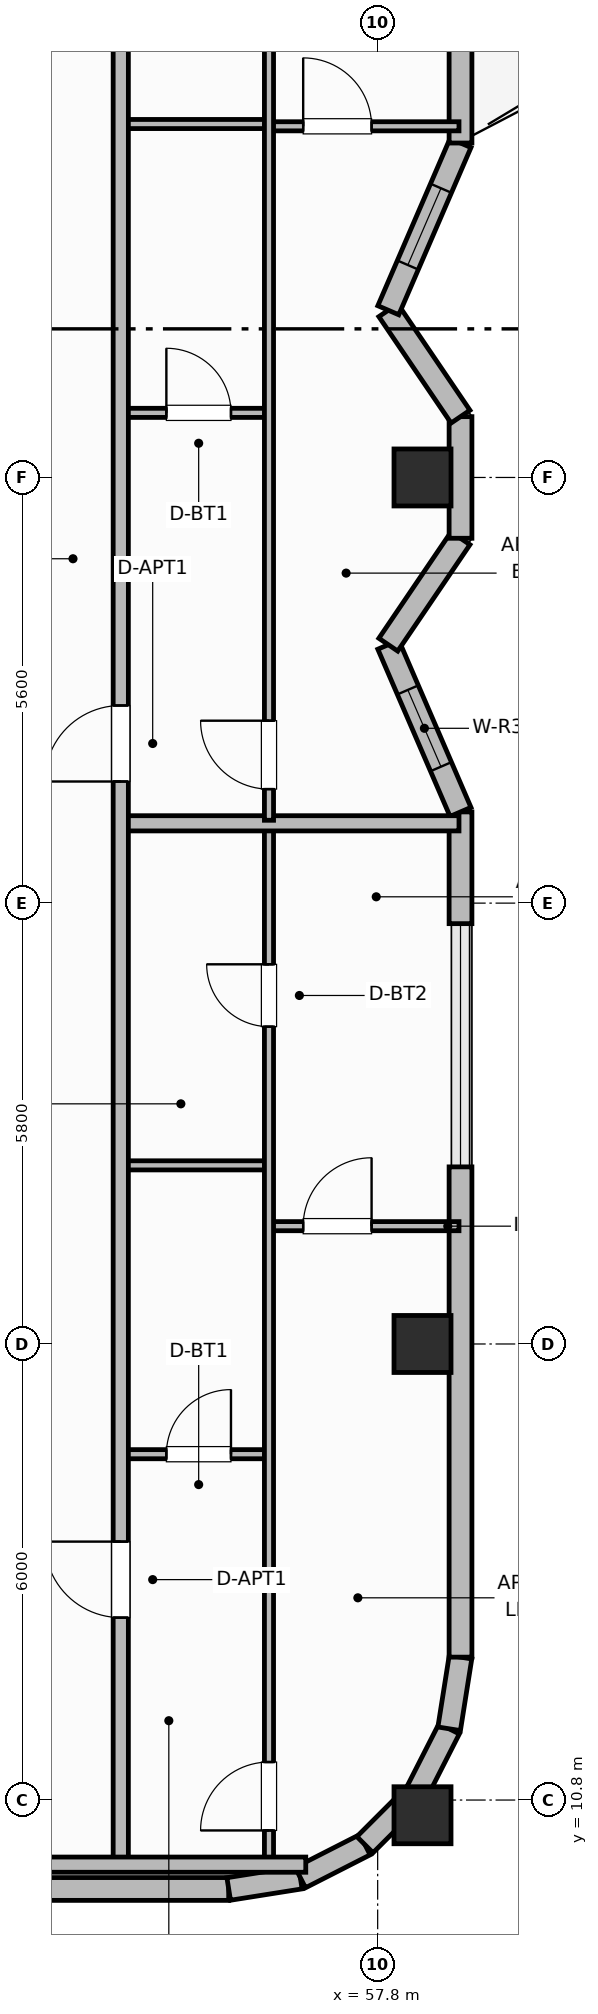
"""IFC4 building model, lengths in metres.
Left out: names, types, materials, properties, quantities, classifications, styles, units other than length and angle.
Written with IfcOpenShell. Run it as: python <this file> out.ifc"""

import sys

from ifc_helpers import new_model, si_unit, direction, frame, frame_2d, origin, origin_2d, place, context, subcontext, project, spatial, rectangle, extrude, element, fill, save


model = new_model("IFC4")
c1 = context("Model", 3, precision=1e-05, world=origin(), true_north=direction((0.0, 1.0)))
c2 = subcontext(c1, "Body", "Model", "MODEL_VIEW")
j1 = project(units=[si_unit("LENGTHUNIT", "METRE"), si_unit("PLANEANGLEUNIT", "RADIAN")], contexts=[c1])
p1 = place(None, origin())
s1 = spatial("IfcSite", under=j1, at=p1, CompositionType="ELEMENT")
p2 = place(p1, origin())
s2 = spatial("IfcBuilding", under=s1, at=p2, CompositionType="ELEMENT")
p3 = place(p2, frame((0.0, 0.0, 293.5)))
s3 = spatial("IfcBuildingStorey", under=s2, at=p3, CompositionType="ELEMENT", Elevation=293.5)
for number, where, z_axis, x_axis in (
    (1, (58.39, 10.6, 0.0), (0.0, 0.0, 1.0), (1.0, 0.0, 0.0)),
    (2, (58.39, 16.8, 0.0), (0.0, 0.0, 1.0), (1.0, 0.0, 0.0)),
    (3, (58.39, 28.2, 0.0), (0.0, 0.0, 1.0), (1.0, 0.0, 0.0)),
):
    element("IfcColumn", number, at=place(p3, frame(where, z_axis=z_axis, x_axis=x_axis)), inside=s3, PredefinedType="COLUMN", context=c2, shape_type="SweptSolid", body=[
        extrude(rectangle(XDim=0.75, YDim=0.75, at=origin_2d()), origin(), (0.0, 0.0, 1.0), 3.7),
    ])
p4 = place(p3, frame((30.21, 9.63, 0.0), z_axis=(0.0, 0.0, 1.0), x_axis=(1.0, 0.0, 0.0)))
e4 = element("IfcWall", 4, at=p4, inside=s3, PredefinedType="SOLIDWALL", context=c2, shape_type="SweptSolid", body=[
    extrude(rectangle(XDim=25.63, YDim=0.3, at=frame_2d((12.815, 0.0))), origin(), (0.0, 0.0, 1.0), 2.71),
])
p5 = place(p4, frame((1.338, 0.0, 0.69)))
e5 = element("IfcOpeningElement", 5, at=p5, cuts=e4, PredefinedType="OPENING", context=c2, shape_type="SweptSolid", body=[
    extrude(rectangle(XDim=2.1, YDim=1.9, at=frame_2d((1.05, 0.95))), frame((0.0, 0.16, 0.0), z_axis=(0.0, -1.0, 0.0), x_axis=(1.0, 0.0, 0.0)), (0.0, 0.0, 1.0), 0.32),
])
p6 = place(p4, frame((8.289, 0.0, 0.69)))
e6 = element("IfcOpeningElement", 6, at=p6, cuts=e4, PredefinedType="OPENING", context=c2, shape_type="SweptSolid", body=[
    extrude(rectangle(XDim=2.1, YDim=1.9, at=frame_2d((1.05, 0.95))), frame((0.0, 0.16, 0.0), z_axis=(0.0, -1.0, 0.0), x_axis=(1.0, 0.0, 0.0)), (0.0, 0.0, 1.0), 0.32),
])
p7 = place(p4, frame((15.241, 0.0, 0.69)))
e7 = element("IfcOpeningElement", 7, at=p7, cuts=e4, PredefinedType="OPENING", context=c2, shape_type="SweptSolid", body=[
    extrude(rectangle(XDim=2.1, YDim=1.9, at=frame_2d((1.05, 0.95))), frame((0.0, 0.16, 0.0), z_axis=(0.0, -1.0, 0.0), x_axis=(1.0, 0.0, 0.0)), (0.0, 0.0, 1.0), 0.32),
])
p8 = place(p4, frame((18.716, 0.0, 0.69)))
e8 = element("IfcOpeningElement", 8, at=p8, cuts=e4, PredefinedType="OPENING", context=c2, shape_type="SweptSolid", body=[
    extrude(rectangle(XDim=2.1, YDim=1.9, at=frame_2d((1.05, 0.95))), frame((0.0, 0.16, 0.0), z_axis=(0.0, -1.0, 0.0), x_axis=(1.0, 0.0, 0.0)), (0.0, 0.0, 1.0), 0.32),
])
p9 = place(p3, frame((55.84, 9.63, 0.0), z_axis=(0.0, 0.0, 1.0), x_axis=(0.987663181641, 0.156593229835, 0.0)))
e9 = element("IfcWall", 9, at=p9, inside=s3, PredefinedType="SOLIDWALL", context=c2, shape_type="SweptSolid", body=[
    extrude(rectangle(XDim=0.954, YDim=0.3, at=frame_2d((0.477, 0.0))), origin(), (0.0, 0.0, 1.0), 2.71),
])
for number, where, z_axis, x_axis in (
    (10, (56.782, 9.779, 0.0), (0.0, 0.0, 1.0), (0.891, 0.454, 0.0)),
    (11, (57.633, 10.212, 0.0), (0.0, 0.0, 1.0), (0.707, 0.707, 0.0)),
    (12, (58.308, 10.887, 0.0), (0.0, 0.0, 1.0), (0.454, 0.891, 0.0)),
):
    element("IfcWall", number, at=place(p3, frame(where, z_axis=z_axis, x_axis=x_axis)), inside=s3, PredefinedType="SOLIDWALL", context=c2, shape_type="SweptSolid", body=[
        extrude(rectangle(XDim=0.954, YDim=0.3, at=frame_2d((0.477, 0.0))), origin(), (0.0, 0.0, 1.0), 2.71),
    ])
p10 = place(p3, frame((58.741, 11.738, 0.0), z_axis=(0.0, 0.0, 1.0), x_axis=(0.156343617883, 0.987702725088, 0.0)))
e13 = element("IfcWall", 13, at=p10, inside=s3, PredefinedType="SOLIDWALL", context=c2, shape_type="SweptSolid", body=[
    extrude(rectangle(XDim=0.954, YDim=0.3, at=frame_2d((0.477, 0.0))), origin(), (0.0, 0.0, 1.0), 2.71),
])
p11 = place(p3, frame((58.89, 12.68, 0.0), z_axis=(0.0, 0.0, 1.0), x_axis=(0.0, 1.0, 0.0)))
e14 = element("IfcWall", 14, at=p11, inside=s3, PredefinedType="SOLIDWALL", context=c2, shape_type="SweptSolid", body=[
    extrude(rectangle(XDim=6.45, YDim=0.3, at=frame_2d((3.225, 0.0))), origin(), (0.0, 0.0, 1.0), 2.71),
])
p12 = place(p3, frame((58.89, 22.33, 0.0), z_axis=(0.0, 0.0, 1.0), x_axis=(0.0, 1.0, 0.0)))
e15 = element("IfcWall", 15, at=p12, inside=s3, PredefinedType="SOLIDWALL", context=c2, shape_type="SweptSolid", body=[
    extrude(rectangle(XDim=1.47, YDim=0.3, at=frame_2d((0.735, 0.0))), origin(), (0.0, 0.0, 1.0), 2.71),
])
p13 = place(p3, frame((58.89, 23.8, 0.0), z_axis=(0.0, 0.0, 1.0), x_axis=(-0.396426258231, 0.918066567186, 0.0)))
e16 = element("IfcWall", 16, at=p13, inside=s3, PredefinedType="SOLIDWALL", context=c2, shape_type="SweptSolid", body=[
    extrude(rectangle(XDim=2.396, YDim=0.3, at=frame_2d((1.198, 0.0))), origin(), (0.0, 0.0, 1.0), 2.71),
])
p14 = place(p13, frame((0.648, 0.0, 0.9)))
e17 = element("IfcOpeningElement", 17, at=p14, cuts=e16, PredefinedType="OPENING", context=c2, shape_type="SweptSolid", body=[
    extrude(rectangle(XDim=1.1, YDim=1.65, at=frame_2d((0.55, 0.825))), frame((0.0, 0.16, 0.0), z_axis=(0.0, -1.0, 0.0), x_axis=(1.0, 0.0, 0.0)), (0.0, 0.0, 1.0), 0.32),
])
p15 = place(p3, frame((57.94, 26.0, 0.0), z_axis=(0.0, 0.0, 1.0), x_axis=(0.561508476251, 0.827470985049, 0.0)))
e18 = element("IfcWall", 18, at=p15, inside=s3, PredefinedType="SOLIDWALL", context=c2, shape_type="SweptSolid", body=[
    extrude(rectangle(XDim=1.692, YDim=0.3, at=frame_2d((0.846, 0.0))), origin(), (0.0, 0.0, 1.0), 2.71),
])
p16 = place(p3, frame((58.89, 27.4, 0.0), z_axis=(0.0, 0.0, 1.0), x_axis=(0.0, 1.0, 0.0)))
e19 = element("IfcWall", 19, at=p16, inside=s3, PredefinedType="SOLIDWALL", context=c2, shape_type="SweptSolid", body=[
    extrude(rectangle(XDim=1.6, YDim=0.3, at=frame_2d((0.8, 0.0))), origin(), (0.0, 0.0, 1.0), 2.71),
])
p17 = place(p3, frame((58.89, 29.0, 0.0), z_axis=(0.0, 0.0, 1.0), x_axis=(-0.561508476251, 0.827470985049, 0.0)))
e20 = element("IfcWall", 20, at=p17, inside=s3, PredefinedType="SOLIDWALL", context=c2, shape_type="SweptSolid", body=[
    extrude(rectangle(XDim=1.692, YDim=0.3, at=frame_2d((0.846, 0.0))), origin(), (0.0, 0.0, 1.0), 2.71),
])
p18 = place(p3, frame((57.94, 30.4, 0.0), z_axis=(0.0, 0.0, 1.0), x_axis=(0.396389181543, 0.918082576218, 0.0)))
e21 = element("IfcWall", 21, at=p18, inside=s3, PredefinedType="SOLIDWALL", context=c2, shape_type="SweptSolid", body=[
    extrude(rectangle(XDim=2.396, YDim=0.3, at=frame_2d((1.198, 0.0))), origin(), (0.0, 0.0, 1.0), 2.71),
])
p19 = place(p18, frame((0.648, 0.0, 0.9)))
e22 = element("IfcOpeningElement", 22, at=p19, cuts=e21, PredefinedType="OPENING", context=c2, shape_type="SweptSolid", body=[
    extrude(rectangle(XDim=1.1, YDim=1.65, at=frame_2d((0.55, 0.825))), frame((0.0, 0.16, 0.0), z_axis=(0.0, -1.0, 0.0), x_axis=(1.0, 0.0, 0.0)), (0.0, 0.0, 1.0), 0.32),
])
p20 = place(p3, frame((58.89, 32.6, 0.0), z_axis=(0.0, 0.0, 1.0), x_axis=(0.0, 1.0, 0.0)))
e23 = element("IfcWall", 23, at=p20, inside=s3, PredefinedType="SOLIDWALL", context=c2, shape_type="SweptSolid", body=[
    extrude(rectangle(XDim=11.12, YDim=0.3, at=frame_2d((5.56, 0.0))), origin(), (0.0, 0.0, 1.0), 2.71),
])
p21 = place(p20, frame((1.7, 0.0, 0.0)))
e24 = element("IfcOpeningElement", 24, at=p21, cuts=e23, PredefinedType="OPENING", context=c2, shape_type="SweptSolid", body=[
    extrude(rectangle(XDim=1.6, YDim=2.1, at=frame_2d((0.8, 1.05))), frame((0.0, 0.16, 0.0), z_axis=(0.0, -1.0, 0.0), x_axis=(1.0, 0.0, 0.0)), (0.0, 0.0, 1.0), 0.32),
])
p22 = place(p20, frame((4.06, 0.0, 0.69)))
e25 = element("IfcOpeningElement", 25, at=p22, cuts=e23, PredefinedType="OPENING", context=c2, shape_type="SweptSolid", body=[
    extrude(rectangle(XDim=1.6, YDim=1.9, at=frame_2d((0.8, 0.95))), frame((0.0, 0.16, 0.0), z_axis=(0.0, -1.0, 0.0), x_axis=(1.0, 0.0, 0.0)), (0.0, 0.0, 1.0), 0.32),
])
p23 = place(p20, frame((8.383, 0.0, 0.69)))
e26 = element("IfcOpeningElement", 26, at=p23, cuts=e23, PredefinedType="OPENING", context=c2, shape_type="SweptSolid", body=[
    extrude(rectangle(XDim=1.6, YDim=1.9, at=frame_2d((0.8, 0.95))), frame((0.0, 0.16, 0.0), z_axis=(0.0, -1.0, 0.0), x_axis=(1.0, 0.0, 0.0)), (0.0, 0.0, 1.0), 0.32),
])
p24 = place(p3, frame((54.42, 15.35, 0.0), z_axis=(0.0, 0.0, 1.0), x_axis=(1.0, 0.0, 0.0)))
e27 = element("IfcWall", 27, at=p24, inside=s3, PredefinedType="PARTITIONING", context=c2, shape_type="SweptSolid", body=[
    extrude(rectangle(XDim=1.95, YDim=0.12, at=frame_2d((0.975, 0.0))), origin(), (0.0, 0.0, 1.0), 2.54),
])
p25 = place(p24, frame((0.6, 0.0, 0.0)))
e28 = element("IfcOpeningElement", 28, at=p25, cuts=e27, PredefinedType="OPENING", context=c2, shape_type="SweptSolid", body=[
    extrude(rectangle(XDim=0.85, YDim=2.1, at=frame_2d((0.425, 1.05))), frame((0.0, 0.07, 0.0), z_axis=(0.0, -1.0, 0.0), x_axis=(1.0, 0.0, 0.0)), (0.0, 0.0, 1.0), 0.14),
])
p26 = place(p3, frame((54.42, 19.15, 0.0), z_axis=(0.0, 0.0, 1.0), x_axis=(1.0, 0.0, 0.0)))
e29 = element("IfcWall", 29, at=p26, inside=s3, PredefinedType="PARTITIONING", context=c2, shape_type="SweptSolid", body=[
    extrude(rectangle(XDim=1.95, YDim=0.12, at=frame_2d((0.975, 0.0))), origin(), (0.0, 0.0, 1.0), 2.54),
])
p27 = place(p3, frame((56.37, 18.35, 0.0), z_axis=(0.0, 0.0, 1.0), x_axis=(1.0, 0.0, 0.0)))
e30 = element("IfcWall", 30, at=p27, inside=s3, PredefinedType="PARTITIONING", context=c2, shape_type="SweptSolid", body=[
    extrude(rectangle(XDim=2.5, YDim=0.12, at=frame_2d((1.25, 0.0))), origin(), (0.0, 0.0, 1.0), 2.54),
])
p28 = place(p27, frame((0.45, 0.0, 0.0)))
e31 = element("IfcOpeningElement", 31, at=p28, cuts=e30, PredefinedType="OPENING", context=c2, shape_type="SweptSolid", body=[
    extrude(rectangle(XDim=0.9, YDim=2.1, at=frame_2d((0.45, 1.05))), frame((0.0, 0.07, 0.0), z_axis=(0.0, -1.0, 0.0), x_axis=(1.0, 0.0, 0.0)), (0.0, 0.0, 1.0), 0.14),
])
p29 = place(p3, frame((56.37, 9.99, 0.0), z_axis=(0.0, 0.0, 1.0), x_axis=(0.0, 1.0, 0.0)))
e32 = element("IfcWall", 32, at=p29, inside=s3, PredefinedType="PARTITIONING", context=c2, shape_type="SweptSolid", body=[
    extrude(rectangle(XDim=13.62, YDim=0.12, at=frame_2d((6.81, 0.0))), origin(), (0.0, 0.0, 1.0), 2.54),
])
p30 = place(p29, frame((0.41, 0.0, 0.0)))
e33 = element("IfcOpeningElement", 33, at=p30, cuts=e32, PredefinedType="OPENING", context=c2, shape_type="SweptSolid", body=[
    extrude(rectangle(XDim=0.9, YDim=2.1, at=frame_2d((0.45, 1.05))), frame((0.0, 0.07, 0.0), z_axis=(0.0, -1.0, 0.0), x_axis=(1.0, 0.0, 0.0)), (0.0, 0.0, 1.0), 0.14),
])
p31 = place(p29, frame((10.985, 0.0, 0.0)))
e34 = element("IfcOpeningElement", 34, at=p31, cuts=e32, PredefinedType="OPENING", context=c2, shape_type="SweptSolid", body=[
    extrude(rectangle(XDim=0.82, YDim=2.08, at=frame_2d((0.41, 1.04))), frame((0.0, 0.07, 0.0), z_axis=(0.0, -1.0, 0.0), x_axis=(1.0, 0.0, 0.0)), (0.0, 0.0, 1.0), 0.14),
])
p32 = place(p3, frame((54.42, 23.65, 0.0), z_axis=(0.0, 0.0, 1.0), x_axis=(1.0, 0.0, 0.0)))
e35 = element("IfcWall", 35, at=p32, inside=s3, PredefinedType="PARTITIONING", context=c2, shape_type="SweptSolid", body=[
    extrude(rectangle(XDim=4.45, YDim=0.2, at=frame_2d((2.225, 0.0))), origin(), (0.0, 0.0, 1.0), 2.54),
])
p33 = place(p3, frame((54.42, 29.05, 0.0), z_axis=(0.0, 0.0, 1.0), x_axis=(1.0, 0.0, 0.0)))
e36 = element("IfcWall", 36, at=p33, inside=s3, PredefinedType="PARTITIONING", context=c2, shape_type="SweptSolid", body=[
    extrude(rectangle(XDim=1.95, YDim=0.12, at=frame_2d((0.975, 0.0))), origin(), (0.0, 0.0, 1.0), 2.54),
])
p34 = place(p33, frame((0.6, 0.0, 0.0)))
e37 = element("IfcOpeningElement", 37, at=p34, cuts=e36, PredefinedType="OPENING", context=c2, shape_type="SweptSolid", body=[
    extrude(rectangle(XDim=0.85, YDim=2.1, at=frame_2d((0.425, 1.05))), frame((0.0, 0.07, 0.0), z_axis=(0.0, -1.0, 0.0), x_axis=(1.0, 0.0, 0.0)), (0.0, 0.0, 1.0), 0.14),
])
p35 = place(p3, frame((54.42, 32.85, 0.0), z_axis=(0.0, 0.0, 1.0), x_axis=(1.0, 0.0, 0.0)))
e38 = element("IfcWall", 38, at=p35, inside=s3, PredefinedType="PARTITIONING", context=c2, shape_type="SweptSolid", body=[
    extrude(rectangle(XDim=1.95, YDim=0.12, at=frame_2d((0.975, 0.0))), origin(), (0.0, 0.0, 1.0), 2.54),
])
p36 = place(p3, frame((56.37, 32.82, 0.0), z_axis=(0.0, 0.0, 1.0), x_axis=(1.0, 0.0, 0.0)))
e39 = element("IfcWall", 39, at=p36, inside=s3, PredefinedType="PARTITIONING", context=c2, shape_type="SweptSolid", body=[
    extrude(rectangle(XDim=2.5, YDim=0.12, at=frame_2d((1.25, 0.0))), origin(), (0.0, 0.0, 1.0), 2.54),
])
p37 = place(p36, frame((0.45, 0.0, 0.0)))
e40 = element("IfcOpeningElement", 40, at=p37, cuts=e39, PredefinedType="OPENING", context=c2, shape_type="SweptSolid", body=[
    extrude(rectangle(XDim=0.9, YDim=2.1, at=frame_2d((0.45, 1.05))), frame((0.0, 0.07, 0.0), z_axis=(0.0, -1.0, 0.0), x_axis=(1.0, 0.0, 0.0)), (0.0, 0.0, 1.0), 0.14),
])
p38 = place(p3, frame((56.37, 23.69, 0.0), z_axis=(0.0, 0.0, 1.0), x_axis=(0.0, 1.0, 0.0)))
e41 = element("IfcWall", 41, at=p38, inside=s3, PredefinedType="PARTITIONING", context=c2, shape_type="SweptSolid", body=[
    extrude(rectangle(XDim=22.72, YDim=0.12, at=frame_2d((11.36, 0.0))), origin(), (0.0, 0.0, 1.0), 2.54),
])
p39 = place(p38, frame((0.41, 0.0, 0.0)))
e42 = element("IfcOpeningElement", 42, at=p39, cuts=e41, PredefinedType="OPENING", context=c2, shape_type="SweptSolid", body=[
    extrude(rectangle(XDim=0.9, YDim=2.1, at=frame_2d((0.45, 1.05))), frame((0.0, 0.07, 0.0), z_axis=(0.0, -1.0, 0.0), x_axis=(1.0, 0.0, 0.0)), (0.0, 0.0, 1.0), 0.14),
])
p40 = place(p38, frame((13.185, 0.0, 0.0)))
e43 = element("IfcOpeningElement", 43, at=p40, cuts=e41, PredefinedType="OPENING", context=c2, shape_type="SweptSolid", body=[
    extrude(rectangle(XDim=0.82, YDim=2.08, at=frame_2d((0.41, 1.04))), frame((0.0, 0.07, 0.0), z_axis=(0.0, -1.0, 0.0), x_axis=(1.0, 0.0, 0.0)), (0.0, 0.0, 1.0), 0.14),
])
p41 = place(p3, frame((54.42, 9.95, 0.0), z_axis=(0.0, 0.0, 1.0), x_axis=(0.0, 1.0, 0.0)))
e44 = element("IfcWall", 44, at=p41, inside=s3, PredefinedType="PARTITIONING", context=c2, shape_type="SweptSolid", body=[
    extrude(rectangle(XDim=36.5, YDim=0.2, at=frame_2d((18.25, 0.0))), origin(), (0.0, 0.0, 1.0), 2.54),
])
p42 = place(p41, frame((3.25, 0.0, 0.0)))
e45 = element("IfcOpeningElement", 45, at=p42, cuts=e44, PredefinedType="OPENING", context=c2, shape_type="SweptSolid", body=[
    extrude(rectangle(XDim=1.0, YDim=2.15, at=frame_2d((0.5, 1.075))), frame((0.0, 0.11, 0.0), z_axis=(0.0, -1.0, 0.0), x_axis=(1.0, 0.0, 0.0)), (0.0, 0.0, 1.0), 0.22),
])
p43 = place(p41, frame((14.25, 0.0, 0.0)))
e46 = element("IfcOpeningElement", 46, at=p43, cuts=e44, PredefinedType="OPENING", context=c2, shape_type="SweptSolid", body=[
    extrude(rectangle(XDim=1.0, YDim=2.15, at=frame_2d((0.5, 1.075))), frame((0.0, 0.11, 0.0), z_axis=(0.0, -1.0, 0.0), x_axis=(1.0, 0.0, 0.0)), (0.0, 0.0, 1.0), 0.22),
])
p44 = place(p3, frame((53.1, 9.95, 0.0), z_axis=(0.0, 0.0, 1.0), x_axis=(1.0, 0.0, 0.0)))
e47 = element("IfcWall", 47, at=p44, inside=s3, PredefinedType="PARTITIONING", context=c2, shape_type="SweptSolid", body=[
    extrude(rectangle(XDim=3.754, YDim=0.2, at=frame_2d((1.877, 0.0))), origin(), (0.0, 0.0, 1.0), 2.54),
])
p45 = place(p14, origin())
e48 = element("IfcWindow", 48, at=p45, inside=s3, PartitioningType="SINGLE_PANEL", PredefinedType="WINDOW", context=c2, shape_type="SweptSolid", body=[
    extrude(rectangle(XDim=1.1, YDim=1.65, at=frame_2d((0.55, 0.825))), frame((0.0, 0.03, 0.0), z_axis=(0.0, -1.0, 0.0), x_axis=(1.0, 0.0, 0.0)), (0.0, 0.0, 1.0), 0.06),
])
fill(e17, e48)
p46 = place(p19, origin())
e49 = element("IfcWindow", 49, at=p46, inside=s3, PartitioningType="SINGLE_PANEL", PredefinedType="WINDOW", context=c2, shape_type="SweptSolid", body=[
    extrude(rectangle(XDim=1.1, YDim=1.65, at=frame_2d((0.55, 0.825))), frame((0.0, 0.03, 0.0), z_axis=(0.0, -1.0, 0.0), x_axis=(1.0, 0.0, 0.0)), (0.0, 0.0, 1.0), 0.06),
])
fill(e22, e49)
p47 = place(p25, origin())
e50 = element("IfcDoor", 50, at=p47, inside=s3, OperationType="SINGLE_SWING_RIGHT", PredefinedType="DOOR", context=c2, shape_type="SweptSolid", body=[
    extrude(rectangle(XDim=0.85, YDim=2.1, at=frame_2d((0.425, 1.05))), frame((0.0, 0.025, 0.0), z_axis=(0.0, -1.0, 0.0), x_axis=(1.0, 0.0, 0.0)), (0.0, 0.0, 1.0), 0.05),
])
fill(e28, e50)
p48 = place(p28, origin())
e51 = element("IfcDoor", 51, at=p48, inside=s3, OperationType="SINGLE_SWING_RIGHT", PredefinedType="DOOR", context=c2, shape_type="SweptSolid", body=[
    extrude(rectangle(XDim=0.9, YDim=2.1, at=frame_2d((0.45, 1.05))), frame((0.0, 0.025, 0.0), z_axis=(0.0, -1.0, 0.0), x_axis=(1.0, 0.0, 0.0)), (0.0, 0.0, 1.0), 0.05),
])
fill(e31, e51)
p49 = place(p30, origin())
e52 = element("IfcDoor", 52, at=p49, inside=s3, OperationType="SINGLE_SWING_LEFT", PredefinedType="DOOR", context=c2, shape_type="SweptSolid", body=[
    extrude(rectangle(XDim=0.9, YDim=2.1, at=frame_2d((0.45, 1.05))), frame((0.0, 0.025, 0.0), z_axis=(0.0, -1.0, 0.0), x_axis=(1.0, 0.0, 0.0)), (0.0, 0.0, 1.0), 0.05),
])
fill(e33, e52)
p50 = place(p31, origin())
e53 = element("IfcDoor", 53, at=p50, inside=s3, OperationType="SINGLE_SWING_RIGHT", PredefinedType="DOOR", context=c2, shape_type="SweptSolid", body=[
    extrude(rectangle(XDim=0.82, YDim=2.08, at=frame_2d((0.41, 1.04))), frame((0.0, 0.025, 0.0), z_axis=(0.0, -1.0, 0.0), x_axis=(1.0, 0.0, 0.0)), (0.0, 0.0, 1.0), 0.05),
])
fill(e34, e53)
p51 = place(p34, origin())
e54 = element("IfcDoor", 54, at=p51, inside=s3, OperationType="SINGLE_SWING_LEFT", PredefinedType="DOOR", context=c2, shape_type="SweptSolid", body=[
    extrude(rectangle(XDim=0.85, YDim=2.1, at=frame_2d((0.425, 1.05))), frame((0.0, 0.025, 0.0), z_axis=(0.0, -1.0, 0.0), x_axis=(1.0, 0.0, 0.0)), (0.0, 0.0, 1.0), 0.05),
])
fill(e37, e54)
p52 = place(p37, origin())
e55 = element("IfcDoor", 55, at=p52, inside=s3, OperationType="SINGLE_SWING_LEFT", PredefinedType="DOOR", context=c2, shape_type="SweptSolid", body=[
    extrude(rectangle(XDim=0.9, YDim=2.1, at=frame_2d((0.45, 1.05))), frame((0.0, 0.025, 0.0), z_axis=(0.0, -1.0, 0.0), x_axis=(1.0, 0.0, 0.0)), (0.0, 0.0, 1.0), 0.05),
])
fill(e40, e55)
p53 = place(p39, origin())
e56 = element("IfcDoor", 56, at=p53, inside=s3, OperationType="SINGLE_SWING_RIGHT", PredefinedType="DOOR", context=c2, shape_type="SweptSolid", body=[
    extrude(rectangle(XDim=0.9, YDim=2.1, at=frame_2d((0.45, 1.05))), frame((0.0, 0.025, 0.0), z_axis=(0.0, -1.0, 0.0), x_axis=(1.0, 0.0, 0.0)), (0.0, 0.0, 1.0), 0.05),
])
fill(e42, e56)
p54 = place(p42, origin())
e57 = element("IfcDoor", 57, at=p54, inside=s3, OperationType="SINGLE_SWING_RIGHT", PredefinedType="DOOR", context=c2, shape_type="SweptSolid", body=[
    extrude(rectangle(XDim=1.0, YDim=2.15, at=frame_2d((0.5, 1.075))), frame((0.0, 0.025, 0.0), z_axis=(0.0, -1.0, 0.0), x_axis=(1.0, 0.0, 0.0)), (0.0, 0.0, 1.0), 0.05),
])
fill(e45, e57)
p55 = place(p43, origin())
e58 = element("IfcDoor", 58, at=p55, inside=s3, OperationType="SINGLE_SWING_LEFT", PredefinedType="DOOR", context=c2, shape_type="SweptSolid", body=[
    extrude(rectangle(XDim=1.0, YDim=2.15, at=frame_2d((0.5, 1.075))), frame((0.0, 0.025, 0.0), z_axis=(0.0, -1.0, 0.0), x_axis=(1.0, 0.0, 0.0)), (0.0, 0.0, 1.0), 0.05),
])
fill(e46, e58)
save(model, sys.argv[1])
